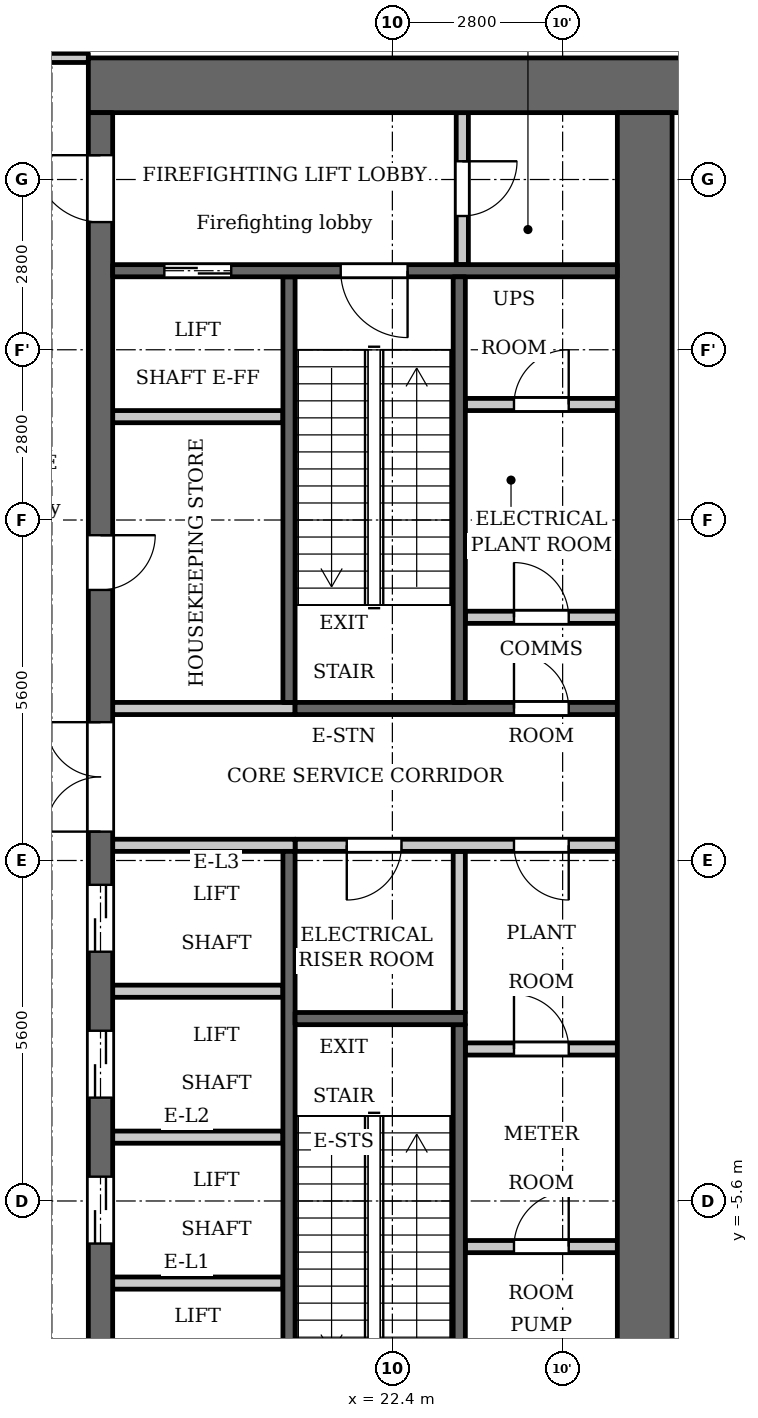
"""IFC4 building model, lengths in metres.
Left out: names, types, materials, properties, quantities, classifications, styles, units other than length and angle.
Written with IfcOpenShell. Run it as: python <this file> out.ifc"""

import sys

from ifc_helpers import new_model, si_unit, direction, frame, frame_2d, origin, place, context, subcontext, project, spatial, rectangle, extrude, element, fill, save


model = new_model("IFC4")
c1 = context("Model", 3, precision=1e-05, world=origin(), true_north=direction((0.0, 1.0)))
c2 = subcontext(c1, "Body", "Model", "MODEL_VIEW")
j1 = project(units=[si_unit("LENGTHUNIT", "METRE"), si_unit("PLANEANGLEUNIT", "RADIAN")], contexts=[c1])
p1 = place(None, origin())
s1 = spatial("IfcSite", under=j1, at=p1, CompositionType="ELEMENT")
p2 = place(p1, origin())
s2 = spatial("IfcBuilding", under=s1, at=p2, CompositionType="ELEMENT")
p3 = place(p2, frame((0.0, 0.0, 72.5)))
s3 = spatial("IfcBuildingStorey", under=s2, at=p3, CompositionType="ELEMENT", Elevation=72.5)
p4 = place(p3, frame((23.5, -2.5, 0.0), z_axis=(0.0, 0.0, 1.0), x_axis=(0.0, 1.0, 0.0)))
e1 = element("IfcWall", 1, at=p4, inside=s3, PredefinedType="PARTITIONING", context=c2, shape_type="SweptSolid", body=[
    extrude(rectangle(XDim=2.65, YDim=0.2, at=frame_2d((1.325, 0.0))), origin(), (0.0, 0.0, 1.0), 4.95),
])
p5 = place(p3, frame((20.7, 2.6, 0.0), z_axis=(0.0, 0.0, 1.0), x_axis=(0.0, 1.0, 0.0)))
e2 = element("IfcWall", 2, at=p5, inside=s3, PredefinedType="SHEAR", context=c2, shape_type="SweptSolid", body=[
    extrude(rectangle(XDim=7.0, YDim=0.2, at=frame_2d((3.5, 0.0))), origin(), (0.0, 0.0, 1.0), 4.95),
])
p6 = place(p3, frame((20.7, -9.6, 0.0), z_axis=(0.0, 0.0, 1.0), x_axis=(0.0, 1.0, 0.0)))
e3 = element("IfcWall", 3, at=p6, inside=s3, PredefinedType="SHEAR", context=c2, shape_type="SweptSolid", body=[
    extrude(rectangle(XDim=9.75, YDim=0.2, at=frame_2d((4.875, 0.0))), origin(), (0.0, 0.0, 1.0), 4.95),
])
p7 = place(p3, frame((20.8, 2.5, 0.0), z_axis=(0.0, 0.0, 1.0), x_axis=(1.0, 0.0, 0.0)))
e4 = element("IfcWall", 4, at=p7, inside=s3, PredefinedType="SHEAR", context=c2, shape_type="SweptSolid", body=[
    extrude(rectangle(XDim=5.3, YDim=0.2, at=frame_2d((2.65, 0.0))), origin(), (0.0, 0.0, 1.0), 4.95),
])
p8 = place(p7, frame((3.6, 0.0, 0.0)))
e5 = element("IfcOpeningElement", 5, at=p8, cuts=e4, PredefinedType="OPENING", context=c2, shape_type="SweptSolid", body=[
    extrude(rectangle(XDim=0.9, YDim=2.1, at=frame_2d((0.45, 1.05))), frame((0.0, 0.11, 0.0), z_axis=(0.0, -1.0, 0.0), x_axis=(1.0, 0.0, 0.0)), (0.0, 0.0, 1.0), 0.22),
])
p9 = place(p3, frame((20.8, 0.25, 0.0), z_axis=(0.0, 0.0, 1.0), x_axis=(1.0, 0.0, 0.0)))
e6 = element("IfcWall", 6, at=p9, inside=s3, PredefinedType="PARTITIONING", context=c2, shape_type="SweptSolid", body=[
    extrude(rectangle(XDim=5.3, YDim=0.2, at=frame_2d((2.65, 0.0))), origin(), (0.0, 0.0, 1.0), 4.95),
])
p10 = place(p9, frame((0.85, 0.0, 0.0)))
e7 = element("IfcOpeningElement", 7, at=p10, cuts=e6, PredefinedType="OPENING", context=c2, shape_type="SweptSolid", body=[
    extrude(rectangle(XDim=0.9, YDim=2.1, at=frame_2d((0.45, 1.05))), frame((0.0, 0.11, 0.0), z_axis=(0.0, -1.0, 0.0), x_axis=(1.0, 0.0, 0.0)), (0.0, 0.0, 1.0), 0.22),
])
p11 = place(p9, frame((3.6, 0.0, 0.0)))
e8 = element("IfcOpeningElement", 8, at=p11, cuts=e6, PredefinedType="OPENING", context=c2, shape_type="SweptSolid", body=[
    extrude(rectangle(XDim=0.9, YDim=2.1, at=frame_2d((0.45, 1.05))), frame((0.0, 0.11, 0.0), z_axis=(0.0, -1.0, 0.0), x_axis=(1.0, 0.0, 0.0)), (0.0, 0.0, 1.0), 0.22),
])
p12 = place(p3, frame((17.4, 12.75, 0.0), z_axis=(0.0, 0.0, 1.0), x_axis=(1.0, 0.0, 0.0)))
e9 = element("IfcWall", 9, at=p12, inside=s3, PredefinedType="SHEAR", context=c2, shape_type="SweptSolid", body=[
    extrude(rectangle(XDim=10.4, YDim=0.9, at=frame_2d((5.2, 0.0))), origin(), (0.0, 0.0, 1.0), 4.95),
])
p13 = place(p3, frame((17.6, -12.3, 0.0), z_axis=(0.0, 0.0, 1.0), x_axis=(0.0, 1.0, 0.0)))
e10 = element("IfcWall", 10, at=p13, inside=s3, PredefinedType="SHEAR", context=c2, shape_type="SweptSolid", body=[
    extrude(rectangle(XDim=24.6, YDim=0.4, at=frame_2d((12.3, 0.0))), origin(), (0.0, 0.0, 1.0), 4.95),
])
p14 = place(p13, frame((6.0, 0.0, 0.0)))
e11 = element("IfcOpeningElement", 11, at=p14, cuts=e10, PredefinedType="OPENING", context=c2, shape_type="SweptSolid", body=[
    extrude(rectangle(XDim=1.1, YDim=2.1, at=frame_2d((0.55, 1.05))), frame((0.0, 0.21, 0.0), z_axis=(0.0, -1.0, 0.0), x_axis=(1.0, 0.0, 0.0)), (0.0, 0.0, 1.0), 0.42),
])
p15 = place(p13, frame((8.4, 0.0, 0.0)))
e12 = element("IfcOpeningElement", 12, at=p15, cuts=e10, PredefinedType="OPENING", context=c2, shape_type="SweptSolid", body=[
    extrude(rectangle(XDim=1.1, YDim=2.1, at=frame_2d((0.55, 1.05))), frame((0.0, 0.21, 0.0), z_axis=(0.0, -1.0, 0.0), x_axis=(1.0, 0.0, 0.0)), (0.0, 0.0, 1.0), 0.42),
])
p16 = place(p13, frame((10.8, 0.0, 0.0)))
e13 = element("IfcOpeningElement", 13, at=p16, cuts=e10, PredefinedType="OPENING", context=c2, shape_type="SweptSolid", body=[
    extrude(rectangle(XDim=1.1, YDim=2.1, at=frame_2d((0.55, 1.05))), frame((0.0, 0.21, 0.0), z_axis=(0.0, -1.0, 0.0), x_axis=(1.0, 0.0, 0.0)), (0.0, 0.0, 1.0), 0.42),
])
p17 = place(p13, frame((16.75, 0.0, 0.0)))
e14 = element("IfcOpeningElement", 14, at=p17, cuts=e10, PredefinedType="OPENING", context=c2, shape_type="SweptSolid", body=[
    extrude(rectangle(XDim=0.9, YDim=2.1, at=frame_2d((0.45, 1.05))), frame((0.0, 0.21, 0.0), z_axis=(0.0, -1.0, 0.0), x_axis=(1.0, 0.0, 0.0)), (0.0, 0.0, 1.0), 0.42),
])
p18 = place(p13, frame((22.8, 0.0, 0.0)))
e15 = element("IfcOpeningElement", 15, at=p18, cuts=e10, PredefinedType="OPENING", context=c2, shape_type="SweptSolid", body=[
    extrude(rectangle(XDim=1.1, YDim=2.1, at=frame_2d((0.55, 1.05))), frame((0.0, 0.21, 0.0), z_axis=(0.0, -1.0, 0.0), x_axis=(1.0, 0.0, 0.0)), (0.0, 0.0, 1.0), 0.42),
])
p19 = place(p13, frame((0.7, 0.0, 0.0)))
e16 = element("IfcOpeningElement", 16, at=p19, cuts=e10, PredefinedType="OPENING", context=c2, shape_type="SweptSolid", body=[
    extrude(rectangle(XDim=1.1, YDim=2.1, at=frame_2d((0.55, 1.05))), frame((0.0, 0.21, 0.0), z_axis=(0.0, -1.0, 0.0), x_axis=(1.0, 0.0, 0.0)), (0.0, 0.0, 1.0), 0.42),
])
p20 = place(p13, frame((12.775, 0.0, 0.0)))
e17 = element("IfcOpeningElement", 17, at=p20, cuts=e10, PredefinedType="OPENING", context=c2, shape_type="SweptSolid", body=[
    extrude(rectangle(XDim=1.8, YDim=2.1, at=frame_2d((0.9, 1.05))), frame((0.0, 0.21, 0.0), z_axis=(0.0, -1.0, 0.0), x_axis=(1.0, 0.0, 0.0)), (0.0, 0.0, 1.0), 0.42),
])
p21 = place(p3, frame((26.55, -12.3, 0.0), z_axis=(0.0, 0.0, 1.0), x_axis=(0.0, 1.0, 0.0)))
e18 = element("IfcWall", 18, at=p21, inside=s3, PredefinedType="SHEAR", context=c2, shape_type="SweptSolid", body=[
    extrude(rectangle(XDim=24.6, YDim=0.9, at=frame_2d((12.3, 0.0))), origin(), (0.0, 0.0, 1.0), 4.95),
])
p22 = place(p3, frame((23.55, 9.8, 0.0), z_axis=(0.0, 0.0, 1.0), x_axis=(0.0, 1.0, 0.0)))
e19 = element("IfcWall", 19, at=p22, inside=s3, PredefinedType="PARTITIONING", context=c2, shape_type="SweptSolid", body=[
    extrude(rectangle(XDim=2.5, YDim=0.2, at=frame_2d((1.25, 0.0))), origin(), (0.0, 0.0, 1.0), 4.95),
])
p23 = place(p22, frame((0.8, 0.0, 0.0)))
e20 = element("IfcOpeningElement", 20, at=p23, cuts=e19, PredefinedType="OPENING", context=c2, shape_type="SweptSolid", body=[
    extrude(rectangle(XDim=0.9, YDim=2.1, at=frame_2d((0.45, 1.05))), frame((0.0, 0.11, 0.0), z_axis=(0.0, -1.0, 0.0), x_axis=(1.0, 0.0, 0.0)), (0.0, 0.0, 1.0), 0.22),
])
p24 = place(p3, frame((23.6, -6.35, 0.0), z_axis=(0.0, 0.0, 1.0), x_axis=(1.0, 0.0, 0.0)))
e21 = element("IfcWall", 21, at=p24, inside=s3, PredefinedType="PARTITIONING", context=c2, shape_type="SweptSolid", body=[
    extrude(rectangle(XDim=2.5, YDim=0.2, at=frame_2d((1.25, 0.0))), origin(), (0.0, 0.0, 1.0), 4.95),
])
p25 = place(p24, frame((0.8, 0.0, 0.0)))
e22 = element("IfcOpeningElement", 22, at=p25, cuts=e21, PredefinedType="OPENING", context=c2, shape_type="SweptSolid", body=[
    extrude(rectangle(XDim=0.9, YDim=2.1, at=frame_2d((0.45, 1.05))), frame((0.0, 0.11, 0.0), z_axis=(0.0, -1.0, 0.0), x_axis=(1.0, 0.0, 0.0)), (0.0, 0.0, 1.0), 0.22),
])
p26 = place(p3, frame((23.6, -3.1, 0.0), z_axis=(0.0, 0.0, 1.0), x_axis=(1.0, 0.0, 0.0)))
e23 = element("IfcWall", 23, at=p26, inside=s3, PredefinedType="PARTITIONING", context=c2, shape_type="SweptSolid", body=[
    extrude(rectangle(XDim=2.5, YDim=0.2, at=frame_2d((1.25, 0.0))), origin(), (0.0, 0.0, 1.0), 4.95),
])
p27 = place(p26, frame((0.8, 0.0, 0.0)))
e24 = element("IfcOpeningElement", 24, at=p27, cuts=e23, PredefinedType="OPENING", context=c2, shape_type="SweptSolid", body=[
    extrude(rectangle(XDim=0.9, YDim=2.1, at=frame_2d((0.45, 1.05))), frame((0.0, 0.11, 0.0), z_axis=(0.0, -1.0, 0.0), x_axis=(1.0, 0.0, 0.0)), (0.0, 0.0, 1.0), 0.22),
])
p28 = place(p3, frame((23.6, 4.0, 0.0), z_axis=(0.0, 0.0, 1.0), x_axis=(1.0, 0.0, 0.0)))
e25 = element("IfcWall", 25, at=p28, inside=s3, PredefinedType="PARTITIONING", context=c2, shape_type="SweptSolid", body=[
    extrude(rectangle(XDim=2.5, YDim=0.2, at=frame_2d((1.25, 0.0))), origin(), (0.0, 0.0, 1.0), 4.95),
])
p29 = place(p28, frame((0.8, 0.0, 0.0)))
e26 = element("IfcOpeningElement", 26, at=p29, cuts=e25, PredefinedType="OPENING", context=c2, shape_type="SweptSolid", body=[
    extrude(rectangle(XDim=0.9, YDim=2.1, at=frame_2d((0.45, 1.05))), frame((0.0, 0.11, 0.0), z_axis=(0.0, -1.0, 0.0), x_axis=(1.0, 0.0, 0.0)), (0.0, 0.0, 1.0), 0.22),
])
p30 = place(p3, frame((23.6, 7.5, 0.0), z_axis=(0.0, 0.0, 1.0), x_axis=(1.0, 0.0, 0.0)))
e27 = element("IfcWall", 27, at=p30, inside=s3, PredefinedType="PARTITIONING", context=c2, shape_type="SweptSolid", body=[
    extrude(rectangle(XDim=2.5, YDim=0.2, at=frame_2d((1.25, 0.0))), origin(), (0.0, 0.0, 1.0), 4.95),
])
p31 = place(p30, frame((0.8, 0.0, 0.0)))
e28 = element("IfcOpeningElement", 28, at=p31, cuts=e27, PredefinedType="OPENING", context=c2, shape_type="SweptSolid", body=[
    extrude(rectangle(XDim=0.9, YDim=2.1, at=frame_2d((0.45, 1.05))), frame((0.0, 0.11, 0.0), z_axis=(0.0, -1.0, 0.0), x_axis=(1.0, 0.0, 0.0)), (0.0, 0.0, 1.0), 0.22),
])
for number, where, z_axis, x_axis in (
    (29, (17.8, -6.95, 0.0), (0.0, 0.0, 1.0), (1.0, 0.0, 0.0)),
    (30, (17.8, -4.55, 0.0), (0.0, 0.0, 1.0), (1.0, 0.0, 0.0)),
    (31, (17.8, -2.15, 0.0), (0.0, 0.0, 1.0), (1.0, 0.0, 0.0)),
):
    element("IfcWall", number, at=place(p3, frame(where, z_axis=z_axis, x_axis=x_axis)), inside=s3, PredefinedType="PARTITIONING", context=c2, shape_type="SweptSolid", body=[
        extrude(rectangle(XDim=2.8, YDim=0.2, at=frame_2d((1.4, 0.0))), origin(), (0.0, 0.0, 1.0), 4.95),
    ])
for number, where, z_axis, x_axis in (
    (32, (17.8, 0.25, 0.0), (0.0, 0.0, 1.0), (1.0, 0.0, 0.0)),
    (33, (17.8, 2.5, 0.0), (0.0, 0.0, 1.0), (1.0, 0.0, 0.0)),
):
    element("IfcWall", number, at=place(p3, frame(where, z_axis=z_axis, x_axis=x_axis)), inside=s3, PredefinedType="PARTITIONING", context=c2, shape_type="SweptSolid", body=[
        extrude(rectangle(XDim=3.0, YDim=0.2, at=frame_2d((1.5, 0.0))), origin(), (0.0, 0.0, 1.0), 4.95),
    ])
p32 = place(p3, frame((17.8, 7.3, 0.0), z_axis=(0.0, 0.0, 1.0), x_axis=(1.0, 0.0, 0.0)))
e34 = element("IfcWall", 34, at=p32, inside=s3, PredefinedType="PARTITIONING", context=c2, shape_type="SweptSolid", body=[
    extrude(rectangle(XDim=2.8, YDim=0.2, at=frame_2d((1.4, 0.0))), origin(), (0.0, 0.0, 1.0), 4.95),
])
p33 = place(p3, frame((17.8, 9.7, 0.0), z_axis=(0.0, 0.0, 1.0), x_axis=(1.0, 0.0, 0.0)))
e35 = element("IfcWall", 35, at=p33, inside=s3, PredefinedType="SHEAR", context=c2, shape_type="SweptSolid", body=[
    extrude(rectangle(XDim=8.3, YDim=0.2, at=frame_2d((4.15, 0.0))), origin(), (0.0, 0.0, 1.0), 4.95),
])
p34 = place(p33, frame((0.85, 0.0, 0.0)))
e36 = element("IfcOpeningElement", 36, at=p34, cuts=e35, PredefinedType="OPENING", context=c2, shape_type="SweptSolid", body=[
    extrude(rectangle(XDim=1.1, YDim=2.1, at=frame_2d((0.55, 1.05))), frame((0.0, 0.11, 0.0), z_axis=(0.0, -1.0, 0.0), x_axis=(1.0, 0.0, 0.0)), (0.0, 0.0, 1.0), 0.22),
])
p35 = place(p33, frame((3.75, 0.0, 0.0)))
e37 = element("IfcOpeningElement", 37, at=p35, cuts=e35, PredefinedType="OPENING", context=c2, shape_type="SweptSolid", body=[
    extrude(rectangle(XDim=1.1, YDim=2.1, at=frame_2d((0.55, 1.05))), frame((0.0, 0.11, 0.0), z_axis=(0.0, -1.0, 0.0), x_axis=(1.0, 0.0, 0.0)), (0.0, 0.0, 1.0), 0.22),
])
p36 = place(p3, frame((23.5, 2.6, 0.0), z_axis=(0.0, 0.0, 1.0), x_axis=(0.0, 1.0, 0.0)))
e38 = element("IfcWall", 38, at=p36, inside=s3, PredefinedType="SHEAR", context=c2, shape_type="SweptSolid", body=[
    extrude(rectangle(XDim=7.0, YDim=0.2, at=frame_2d((3.5, 0.0))), origin(), (0.0, 0.0, 1.0), 4.95),
])
p37 = place(p3, frame((23.5, -9.6, 0.0), z_axis=(0.0, 0.0, 1.0), x_axis=(0.0, 1.0, 0.0)))
e39 = element("IfcWall", 39, at=p37, inside=s3, PredefinedType="SHEAR", context=c2, shape_type="SweptSolid", body=[
    extrude(rectangle(XDim=6.9, YDim=0.2, at=frame_2d((3.45, 0.0))), origin(), (0.0, 0.0, 1.0), 4.95),
])
p38 = place(p3, frame((20.8, -2.6, 0.0), z_axis=(0.0, 0.0, 1.0), x_axis=(1.0, 0.0, 0.0)))
e40 = element("IfcWall", 40, at=p38, inside=s3, PredefinedType="SHEAR", context=c2, shape_type="SweptSolid", body=[
    extrude(rectangle(XDim=2.8, YDim=0.2, at=frame_2d((1.4, 0.0))), origin(), (0.0, 0.0, 1.0), 4.95),
])
p39 = place(p3, frame((11.384, 13.2, 0.0), z_axis=(0.0, 0.0, 1.0), x_axis=(1.0, 0.0, 0.0)))
e41 = element("IfcWall", 41, at=p39, inside=s3, PredefinedType="PARTITIONING", context=c2, shape_type="SweptSolid", body=[
    extrude(rectangle(XDim=6.016, YDim=0.15, at=frame_2d((3.008, 0.0))), origin(), (0.0, 0.0, 1.0), 4.95),
])
p40 = place(p39, frame((4.166, 0.0, 0.0)))
e42 = element("IfcOpeningElement", 42, at=p40, cuts=e41, PredefinedType="OPENING", context=c2, shape_type="SweptSolid", body=[
    extrude(rectangle(XDim=1.2, YDim=2.1, at=frame_2d((0.6, 1.05))), frame((0.0, 0.085, 0.0), z_axis=(0.0, -1.0, 0.0), x_axis=(1.0, 0.0, 0.0)), (0.0, 0.0, 1.0), 0.17),
])
p41 = place(p39, frame((0.306, 0.0, 0.0)))
e43 = element("IfcOpeningElement", 43, at=p41, cuts=e41, PredefinedType="OPENING", context=c2, shape_type="SweptSolid", body=[
    extrude(rectangle(XDim=0.9, YDim=2.1, at=frame_2d((0.45, 1.05))), frame((0.0, 0.085, 0.0), z_axis=(0.0, -1.0, 0.0), x_axis=(1.0, 0.0, 0.0)), (0.0, 0.0, 1.0), 0.17),
])
p42 = place(p39, frame((2.116, 0.0, 0.0)))
e44 = element("IfcOpeningElement", 44, at=p42, cuts=e41, PredefinedType="OPENING", context=c2, shape_type="SweptSolid", body=[
    extrude(rectangle(XDim=0.9, YDim=2.1, at=frame_2d((0.45, 1.05))), frame((0.0, 0.085, 0.0), z_axis=(0.0, -1.0, 0.0), x_axis=(1.0, 0.0, 0.0)), (0.0, 0.0, 1.0), 0.17),
])
p43 = place(p14, origin())
e45 = element("IfcDoor", 45, at=p43, inside=s3, OperationType="DOUBLE_DOOR_SLIDING", PredefinedType="DOOR", context=c2, shape_type="SweptSolid", body=[
    extrude(rectangle(XDim=1.1, YDim=2.1, at=frame_2d((0.55, 1.05))), frame((0.0, 0.025, 0.0), z_axis=(0.0, -1.0, 0.0), x_axis=(1.0, 0.0, 0.0)), (0.0, 0.0, 1.0), 0.05),
])
fill(e11, e45)
p44 = place(p15, origin())
e46 = element("IfcDoor", 46, at=p44, inside=s3, OperationType="DOUBLE_DOOR_SLIDING", PredefinedType="DOOR", context=c2, shape_type="SweptSolid", body=[
    extrude(rectangle(XDim=1.1, YDim=2.1, at=frame_2d((0.55, 1.05))), frame((0.0, 0.025, 0.0), z_axis=(0.0, -1.0, 0.0), x_axis=(1.0, 0.0, 0.0)), (0.0, 0.0, 1.0), 0.05),
])
fill(e12, e46)
p45 = place(p16, origin())
e47 = element("IfcDoor", 47, at=p45, inside=s3, OperationType="DOUBLE_DOOR_SLIDING", PredefinedType="DOOR", context=c2, shape_type="SweptSolid", body=[
    extrude(rectangle(XDim=1.1, YDim=2.1, at=frame_2d((0.55, 1.05))), frame((0.0, 0.025, 0.0), z_axis=(0.0, -1.0, 0.0), x_axis=(1.0, 0.0, 0.0)), (0.0, 0.0, 1.0), 0.05),
])
fill(e13, e47)
p46 = place(p17, origin())
e48 = element("IfcDoor", 48, at=p46, inside=s3, OperationType="SINGLE_SWING_RIGHT", PredefinedType="DOOR", context=c2, shape_type="SweptSolid", body=[
    extrude(rectangle(XDim=0.9, YDim=2.1, at=frame_2d((0.45, 1.05))), frame((0.0, 0.025, 0.0), z_axis=(0.0, -1.0, 0.0), x_axis=(1.0, 0.0, 0.0)), (0.0, 0.0, 1.0), 0.05),
])
fill(e14, e48)
p47 = place(p34, origin())
e49 = element("IfcDoor", 49, at=p47, inside=s3, OperationType="DOUBLE_DOOR_SLIDING", PredefinedType="DOOR", context=c2, shape_type="SweptSolid", body=[
    extrude(rectangle(XDim=1.1, YDim=2.1, at=frame_2d((0.55, 1.05))), frame((0.0, 0.025, 0.0), z_axis=(0.0, -1.0, 0.0), x_axis=(1.0, 0.0, 0.0)), (0.0, 0.0, 1.0), 0.05),
])
fill(e36, e49)
p48 = place(p18, origin())
e50 = element("IfcDoor", 50, at=p48, inside=s3, OperationType="SINGLE_SWING_LEFT", PredefinedType="DOOR", context=c2, shape_type="SweptSolid", body=[
    extrude(rectangle(XDim=1.1, YDim=2.1, at=frame_2d((0.55, 1.05))), frame((0.0, 0.025, 0.0), z_axis=(0.0, -1.0, 0.0), x_axis=(1.0, 0.0, 0.0)), (0.0, 0.0, 1.0), 0.05),
])
fill(e15, e50)
p49 = place(p23, origin())
e51 = element("IfcDoor", 51, at=p49, inside=s3, OperationType="SINGLE_SWING_RIGHT", PredefinedType="DOOR", context=c2, shape_type="SweptSolid", body=[
    extrude(rectangle(XDim=0.9, YDim=2.1, at=frame_2d((0.45, 1.05))), frame((0.0, 0.025, 0.0), z_axis=(0.0, -1.0, 0.0), x_axis=(1.0, 0.0, 0.0)), (0.0, 0.0, 1.0), 0.05),
])
fill(e20, e51)
p50 = place(p35, origin())
e52 = element("IfcDoor", 52, at=p50, inside=s3, OperationType="SINGLE_SWING_RIGHT", PredefinedType="DOOR", context=c2, shape_type="SweptSolid", body=[
    extrude(rectangle(XDim=1.1, YDim=2.1, at=frame_2d((0.55, 1.05))), frame((0.0, 0.025, 0.0), z_axis=(0.0, -1.0, 0.0), x_axis=(1.0, 0.0, 0.0)), (0.0, 0.0, 1.0), 0.05),
])
fill(e37, e52)
p51 = place(p20, origin())
e53 = element("IfcDoor", 53, at=p51, inside=s3, OperationType="DOUBLE_DOOR_SINGLE_SWING", PredefinedType="DOOR", context=c2, shape_type="SweptSolid", body=[
    extrude(rectangle(XDim=1.8, YDim=2.1, at=frame_2d((0.9, 1.05))), frame((0.0, 0.025, 0.0), z_axis=(0.0, -1.0, 0.0), x_axis=(1.0, 0.0, 0.0)), (0.0, 0.0, 1.0), 0.05),
])
fill(e17, e53)
p52 = place(p10, origin())
e54 = element("IfcDoor", 54, at=p52, inside=s3, OperationType="SINGLE_SWING_LEFT", PredefinedType="DOOR", context=c2, shape_type="SweptSolid", body=[
    extrude(rectangle(XDim=0.9, YDim=2.1, at=frame_2d((0.45, 1.05))), frame((0.0, 0.025, 0.0), z_axis=(0.0, -1.0, 0.0), x_axis=(1.0, 0.0, 0.0)), (0.0, 0.0, 1.0), 0.05),
])
fill(e7, e54)
p53 = place(p25, origin())
e55 = element("IfcDoor", 55, at=p53, inside=s3, OperationType="SINGLE_SWING_LEFT", PredefinedType="DOOR", context=c2, shape_type="SweptSolid", body=[
    extrude(rectangle(XDim=0.9, YDim=2.1, at=frame_2d((0.45, 1.05))), frame((0.0, 0.025, 0.0), z_axis=(0.0, -1.0, 0.0), x_axis=(1.0, 0.0, 0.0)), (0.0, 0.0, 1.0), 0.05),
])
fill(e22, e55)
p54 = place(p27, origin())
e56 = element("IfcDoor", 56, at=p54, inside=s3, OperationType="SINGLE_SWING_RIGHT", PredefinedType="DOOR", context=c2, shape_type="SweptSolid", body=[
    extrude(rectangle(XDim=0.9, YDim=2.1, at=frame_2d((0.45, 1.05))), frame((0.0, 0.025, 0.0), z_axis=(0.0, -1.0, 0.0), x_axis=(1.0, 0.0, 0.0)), (0.0, 0.0, 1.0), 0.05),
])
fill(e24, e56)
p55 = place(p11, origin())
e57 = element("IfcDoor", 57, at=p55, inside=s3, OperationType="SINGLE_SWING_RIGHT", PredefinedType="DOOR", context=c2, shape_type="SweptSolid", body=[
    extrude(rectangle(XDim=0.9, YDim=2.1, at=frame_2d((0.45, 1.05))), frame((0.0, 0.025, 0.0), z_axis=(0.0, -1.0, 0.0), x_axis=(1.0, 0.0, 0.0)), (0.0, 0.0, 1.0), 0.05),
])
fill(e8, e57)
p56 = place(p29, origin())
e58 = element("IfcDoor", 58, at=p56, inside=s3, OperationType="SINGLE_SWING_RIGHT", PredefinedType="DOOR", context=c2, shape_type="SweptSolid", body=[
    extrude(rectangle(XDim=0.9, YDim=2.1, at=frame_2d((0.45, 1.05))), frame((0.0, 0.025, 0.0), z_axis=(0.0, -1.0, 0.0), x_axis=(1.0, 0.0, 0.0)), (0.0, 0.0, 1.0), 0.05),
])
fill(e26, e58)
p57 = place(p31, origin())
e59 = element("IfcDoor", 59, at=p57, inside=s3, OperationType="SINGLE_SWING_LEFT", PredefinedType="DOOR", context=c2, shape_type="SweptSolid", body=[
    extrude(rectangle(XDim=0.9, YDim=2.1, at=frame_2d((0.45, 1.05))), frame((0.0, 0.025, 0.0), z_axis=(0.0, -1.0, 0.0), x_axis=(1.0, 0.0, 0.0)), (0.0, 0.0, 1.0), 0.05),
])
fill(e28, e59)
p58 = place(p8, origin())
e60 = element("IfcDoor", 60, at=p58, inside=s3, OperationType="SINGLE_SWING_RIGHT", PredefinedType="DOOR", context=c2, shape_type="SweptSolid", body=[
    extrude(rectangle(XDim=0.9, YDim=2.1, at=frame_2d((0.45, 1.05))), frame((0.0, 0.025, 0.0), z_axis=(0.0, -1.0, 0.0), x_axis=(1.0, 0.0, 0.0)), (0.0, 0.0, 1.0), 0.05),
])
fill(e5, e60)
save(model, sys.argv[1])
